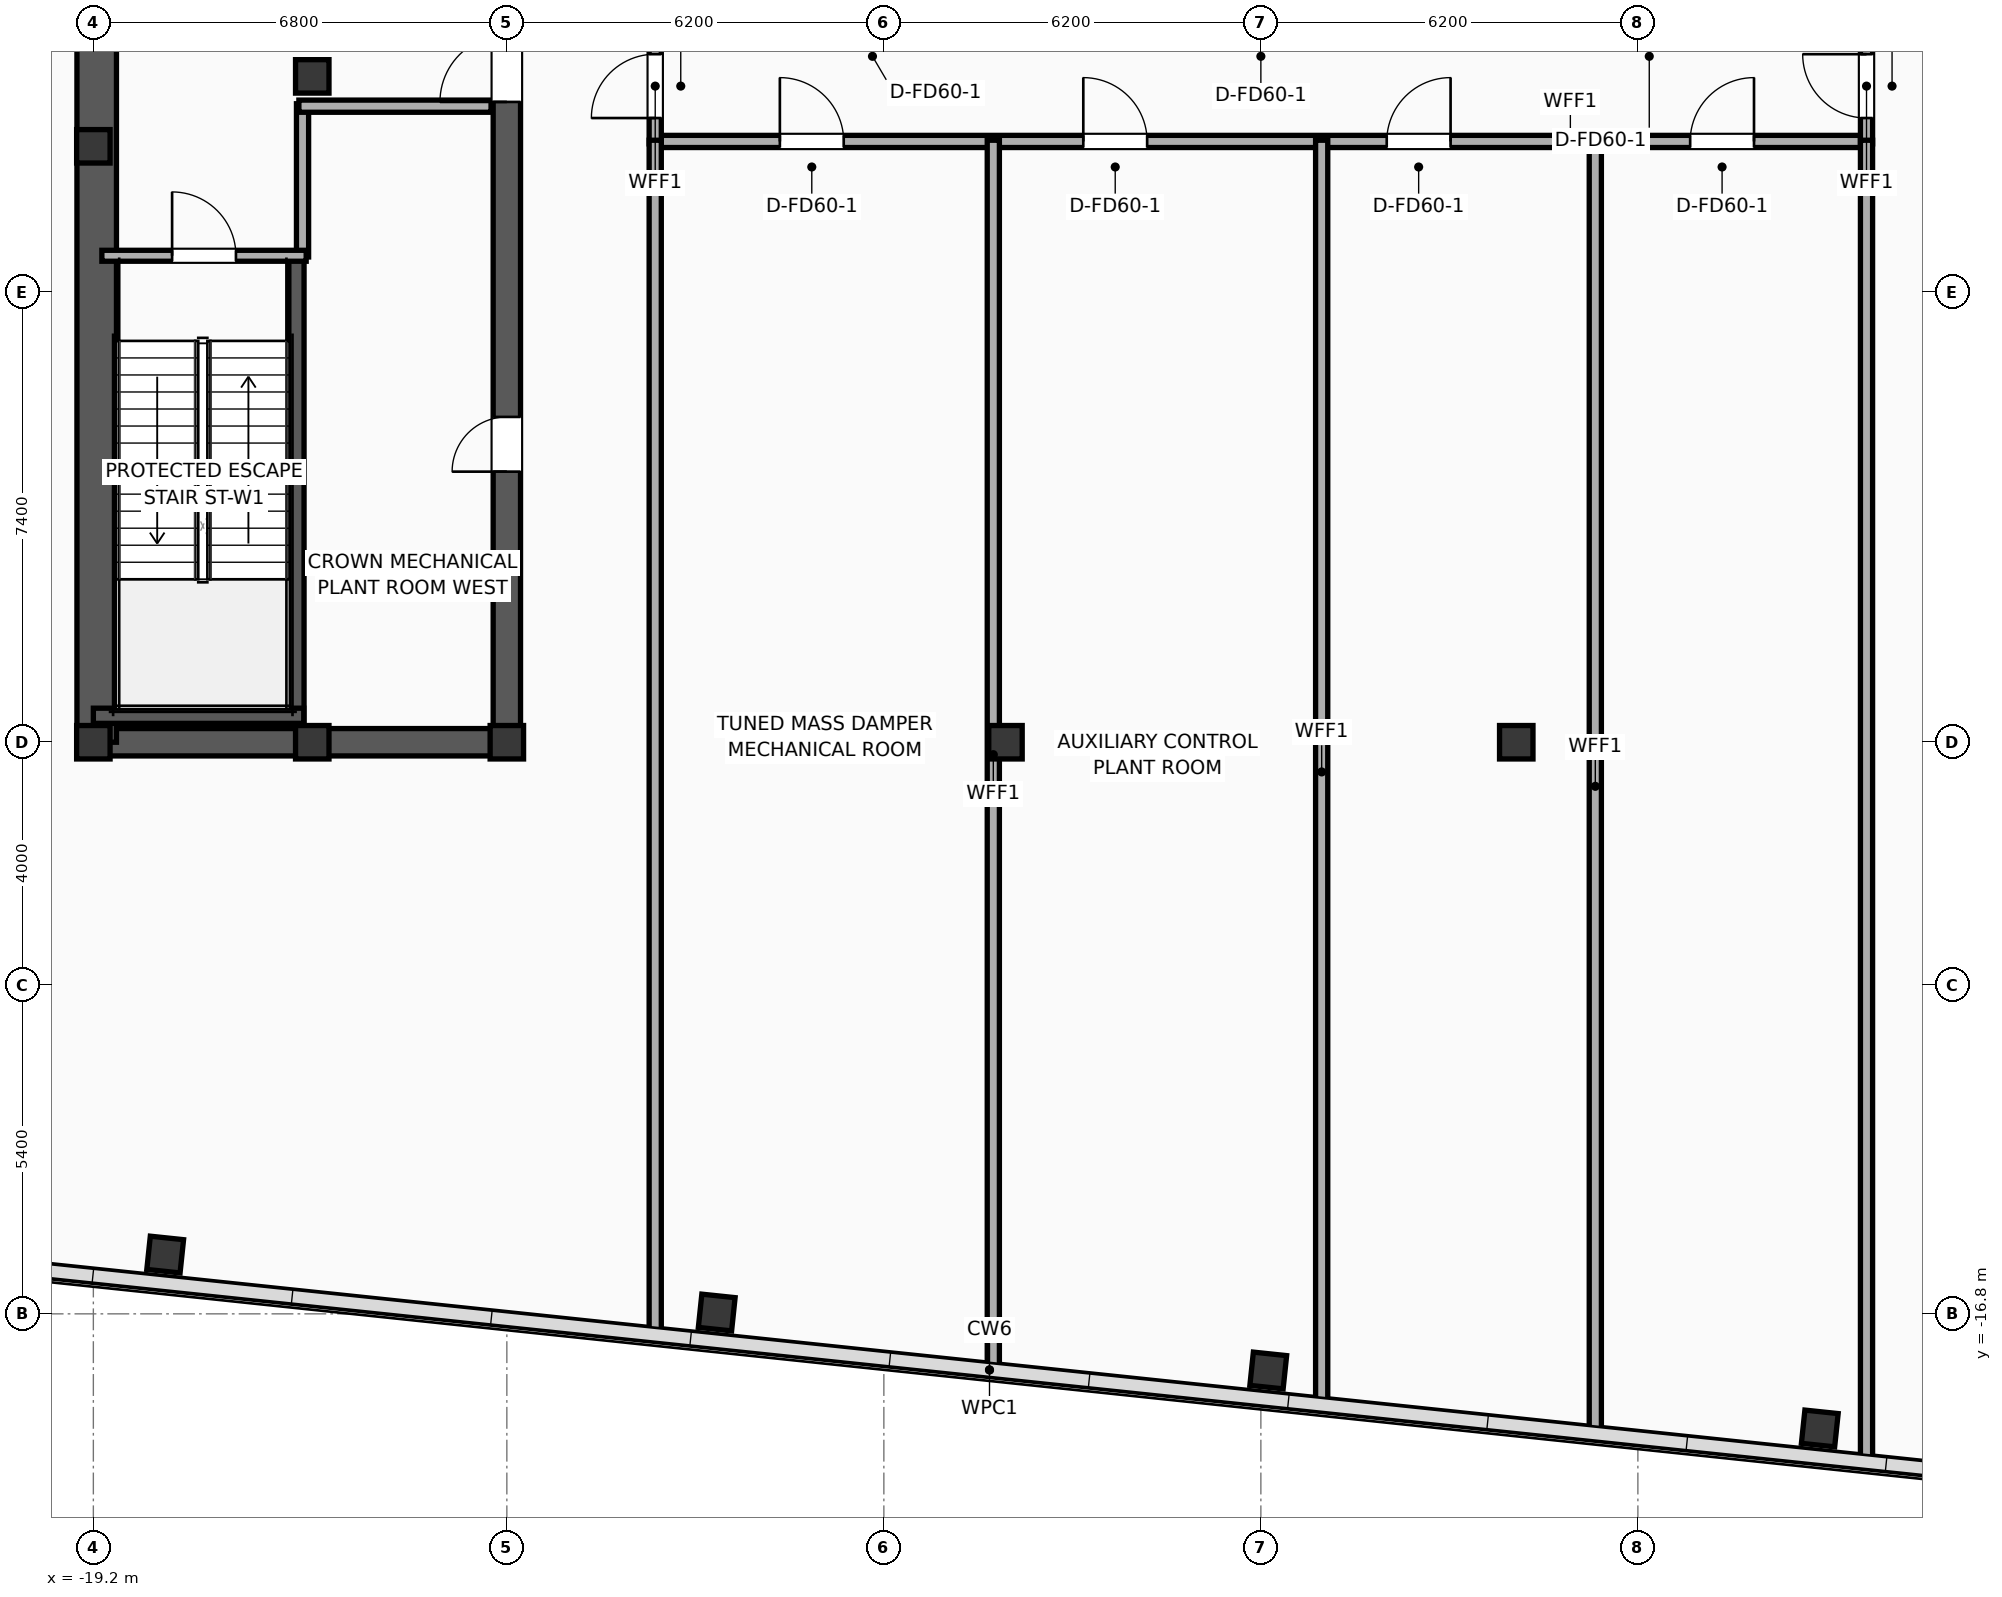
"""IFC4 building model, lengths in metres.
Left out: names, types, materials, properties, quantities, classifications, styles, units other than length and angle.
Written with IfcOpenShell. Run it as: python <this file> out.ifc"""

import sys

from ifc_helpers import new_model, si_unit, direction, frame, frame_2d, origin, origin_2d, place, context, subcontext, project, spatial, rectangle, hollow_rectangle, extrude, element, fill, save


model = new_model("IFC4")
c1 = context("Model", 3, precision=1e-05, world=origin(), true_north=direction((0.0, 1.0)))
c2 = subcontext(c1, "Body", "Model", "MODEL_VIEW")
j1 = project(units=[si_unit("LENGTHUNIT", "METRE"), si_unit("PLANEANGLEUNIT", "RADIAN")], contexts=[c1])
p1 = place(None, origin())
s1 = spatial("IfcSite", under=j1, at=p1, CompositionType="ELEMENT")
p2 = place(p1, origin())
s2 = spatial("IfcBuilding", under=s1, at=p2, CompositionType="ELEMENT")
p3 = place(p2, frame((0.0, 0.0, 326.6)))
s3 = spatial("IfcBuildingStorey", under=s2, at=p3, CompositionType="ELEMENT", Elevation=326.6)
for number, where, z_axis, x_axis in (
    (1, (-19.2, -7.4, 0.0), (0.0, 0.0, 1.0), (1.0, 0.0, 0.0)),
    (2, (-19.2, 2.4, 0.0), (0.0, 0.0, 1.0), (1.0, 0.0, 0.0)),
    (3, (-15.6, -7.4, 0.0), (0.0, 0.0, 1.0), (1.0, 0.0, 0.0)),
    (4, (-12.4, -7.4, 0.0), (0.0, 0.0, 1.0), (1.0, 0.0, 0.0)),
    (5, (-15.6, 3.55, 0.0), (0.0, 0.0, 1.0), (1.0, 0.0, 0.0)),
):
    element("IfcColumn", number, at=place(p3, frame(where, z_axis=z_axis, x_axis=x_axis)), inside=s3, PredefinedType="COLUMN", context=c2, shape_type="SweptSolid", body=[
        extrude(hollow_rectangle(XDim=0.55, YDim=0.55, WallThickness=0.022, at=origin_2d()), origin(), (0.0, 0.0, 1.0), 5.3),
    ])
p4 = place(p3, frame((-19.425, -7.4, 0.0), z_axis=(0.0, 0.0, 1.0), x_axis=(1.0, 0.0, 0.0)))
e6 = element("IfcWall", 6, at=p4, inside=s3, PredefinedType="SHEAR", context=c2, shape_type="SweptSolid", body=[
    extrude(rectangle(XDim=7.25, YDim=0.45, at=frame_2d((3.625, 0.0))), origin(), (0.0, 0.0, 1.0), 5.025),
])
p5 = place(p3, frame((-19.145, -7.4, 0.0), z_axis=(0.0, 0.0, 1.0), x_axis=(0.0, 1.0, 0.0)))
e7 = element("IfcWall", 7, at=p5, inside=s3, PredefinedType="SHEAR", context=c2, shape_type="SweptSolid", body=[
    extrude(rectangle(XDim=14.8, YDim=0.65, at=frame_2d((7.4, 0.0))), origin(), (0.0, 0.0, 1.0), 5.025),
])
p6 = place(p3, frame((-12.4, -7.4, 0.0), z_axis=(0.0, 0.0, 1.0), x_axis=(0.0, 1.0, 0.0)))
e8 = element("IfcWall", 8, at=p6, inside=s3, PredefinedType="SHEAR", context=c2, shape_type="SweptSolid", body=[
    extrude(rectangle(XDim=14.8, YDim=0.45, at=frame_2d((7.4, 0.0))), origin(), (0.0, 0.0, 1.0), 5.025),
])
p7 = place(p6, frame((10.53, 0.0, 0.0)))
e9 = element("IfcOpeningElement", 9, at=p7, cuts=e8, PredefinedType="OPENING", context=c2, shape_type="SweptSolid", body=[
    extrude(rectangle(XDim=1.1, YDim=2.05, at=frame_2d((0.55, 1.025))), frame((0.0, 0.235, 0.0), z_axis=(0.0, -1.0, 0.0), x_axis=(1.0, 0.0, 0.0)), (0.0, 0.0, 1.0), 0.47),
])
p8 = place(p6, frame((4.45, 0.0, 0.0)))
e10 = element("IfcOpeningElement", 10, at=p8, cuts=e8, PredefinedType="OPENING", context=c2, shape_type="SweptSolid", body=[
    extrude(rectangle(XDim=0.9, YDim=2.05, at=frame_2d((0.45, 1.025))), frame((0.0, 0.235, 0.0), z_axis=(0.0, -1.0, 0.0), x_axis=(1.0, 0.0, 0.0)), (0.0, 0.0, 1.0), 0.47),
])
p9 = place(p3, frame((-15.86, -7.085, 0.0), z_axis=(0.0, 0.0, 1.0), x_axis=(0.0, 1.0, 0.0)))
e11 = element("IfcWall", 11, at=p9, inside=s3, PredefinedType="SOLIDWALL", context=c2, shape_type="SweptSolid", body=[
    extrude(rectangle(XDim=7.685, YDim=0.25, at=frame_2d((3.843, 0.0))), origin(), (0.0, 0.0, 1.0), 5.025),
])
p10 = place(p3, frame((-19.2, -6.965, 0.0), z_axis=(0.0, 0.0, 1.0), x_axis=(1.0, 0.0, 0.0)))
e12 = element("IfcWall", 12, at=p10, inside=s3, PredefinedType="SOLIDWALL", context=c2, shape_type="SweptSolid", body=[
    extrude(rectangle(XDim=3.46, YDim=0.25, at=frame_2d((1.73, 0.0))), origin(), (0.0, 0.0, 1.0), 5.025),
])
for number, where, z_axis, x_axis in (
    (13, (-4.2, -7.4, 0.0), (0.0, 0.0, 1.0), (1.0, 0.0, 0.0)),
    (14, (4.2, -7.4, 0.0), (0.0, 0.0, 1.0), (1.0, 0.0, 0.0)),
    (15, (-18.019, -15.825, 0.0), (0.0, 0.0, 1.0), (0.995, -0.105, 0.0)),
    (16, (-8.948, -16.778, 0.0), (0.0, 0.0, 1.0), (0.995, -0.105, 0.0)),
    (17, (0.121, -17.732, 0.0), (0.0, 0.0, 1.0), (0.995, -0.105, 0.0)),
    (18, (9.191, -18.685, 0.0), (0.0, 0.0, 1.0), (0.995, -0.105, 0.0)),
):
    element("IfcColumn", number, at=place(p3, frame(where, z_axis=z_axis, x_axis=x_axis)), inside=s3, PredefinedType="COLUMN", context=c2, shape_type="SweptSolid", body=[
        extrude(hollow_rectangle(XDim=0.55, YDim=0.55, WallThickness=0.022, at=origin_2d()), origin(), (0.0, 0.0, 1.0), 5.3),
    ])
p11 = place(p3, frame((18.195, -20.104, 0.0), z_axis=(0.0, 0.0, 1.0), x_axis=(-0.994522116558, 0.104526358762, 0.0)))
e19 = element("IfcWall", 19, at=p11, inside=s3, PredefinedType="PARAPET", context=c2, shape_type="SweptSolid", body=[
    extrude(rectangle(XDim=45.564, YDim=0.22, at=frame_2d((22.782, 0.0))), origin(), (0.0, 0.0, 1.0), 1.2),
])
p12 = place(p3, frame((-15.76, 0.58, 0.0), z_axis=(0.0, 0.0, 1.0), x_axis=(0.0, 1.0, 0.0)))
e20 = element("IfcWall", 20, at=p12, inside=s3, PredefinedType="PARTITIONING", context=c2, shape_type="SweptSolid", body=[
    extrude(rectangle(XDim=2.52, YDim=0.2, at=frame_2d((1.26, 0.0))), origin(), (0.0, 0.0, 1.0), 5.025),
])
p13 = place(p3, frame((-15.82, 3.06, 0.0), z_axis=(0.0, 0.0, 1.0), x_axis=(1.0, 0.0, 0.0)))
e21 = element("IfcWall", 21, at=p13, inside=s3, PredefinedType="PARTITIONING", context=c2, shape_type="SweptSolid", body=[
    extrude(rectangle(XDim=3.16, YDim=0.2, at=frame_2d((1.58, 0.0))), origin(), (0.0, 0.0, 1.0), 5.025),
])
p14 = place(p3, frame((-19.06, 0.6, 0.0), z_axis=(0.0, 0.0, 1.0), x_axis=(1.0, 0.0, 0.0)))
e22 = element("IfcWall", 22, at=p14, inside=s3, PredefinedType="PARTITIONING", context=c2, shape_type="SweptSolid", body=[
    extrude(rectangle(XDim=3.36, YDim=0.18, at=frame_2d((1.68, 0.0))), origin(), (0.0, 0.0, 1.0), 5.025),
])
p15 = place(p14, frame((1.155, 0.0, 0.0)))
e23 = element("IfcOpeningElement", 23, at=p15, cuts=e22, PredefinedType="OPENING", context=c2, shape_type="SweptSolid", body=[
    extrude(rectangle(XDim=1.05, YDim=2.05, at=frame_2d((0.525, 1.025))), frame((0.0, 0.1, 0.0), z_axis=(0.0, -1.0, 0.0), x_axis=(1.0, 0.0, 0.0)), (0.0, 0.0, 1.0), 0.2),
])
p16 = place(p3, frame((-9.98, 2.48, 0.0), z_axis=(0.0, 0.0, 1.0), x_axis=(1.0, 0.0, 0.0)))
e24 = element("IfcWall", 24, at=p16, inside=s3, PredefinedType="PARTITIONING", context=c2, shape_type="SweptSolid", body=[
    extrude(rectangle(XDim=19.96, YDim=0.2, at=frame_2d((9.98, 0.0))), origin(), (0.0, 0.0, 1.0), 4.595),
])
p17 = place(p16, frame((2.07, 0.0, 0.0)))
e25 = element("IfcOpeningElement", 25, at=p17, cuts=e24, PredefinedType="OPENING", context=c2, shape_type="SweptSolid", body=[
    extrude(rectangle(XDim=1.05, YDim=2.05, at=frame_2d((0.525, 1.025))), frame((0.0, 0.11, 0.0), z_axis=(0.0, -1.0, 0.0), x_axis=(1.0, 0.0, 0.0)), (0.0, 0.0, 1.0), 0.22),
])
p18 = place(p16, frame((7.06, 0.0, 0.0)))
e26 = element("IfcOpeningElement", 26, at=p18, cuts=e24, PredefinedType="OPENING", context=c2, shape_type="SweptSolid", body=[
    extrude(rectangle(XDim=1.05, YDim=2.05, at=frame_2d((0.525, 1.025))), frame((0.0, 0.11, 0.0), z_axis=(0.0, -1.0, 0.0), x_axis=(1.0, 0.0, 0.0)), (0.0, 0.0, 1.0), 0.22),
])
p19 = place(p16, frame((12.05, 0.0, 0.0)))
e27 = element("IfcOpeningElement", 27, at=p19, cuts=e24, PredefinedType="OPENING", context=c2, shape_type="SweptSolid", body=[
    extrude(rectangle(XDim=1.05, YDim=2.05, at=frame_2d((0.525, 1.025))), frame((0.0, 0.11, 0.0), z_axis=(0.0, -1.0, 0.0), x_axis=(1.0, 0.0, 0.0)), (0.0, 0.0, 1.0), 0.22),
])
p20 = place(p16, frame((17.04, 0.0, 0.0)))
e28 = element("IfcOpeningElement", 28, at=p20, cuts=e24, PredefinedType="OPENING", context=c2, shape_type="SweptSolid", body=[
    extrude(rectangle(XDim=1.05, YDim=2.05, at=frame_2d((0.525, 1.025))), frame((0.0, 0.11, 0.0), z_axis=(0.0, -1.0, 0.0), x_axis=(1.0, 0.0, 0.0)), (0.0, 0.0, 1.0), 0.22),
])
p21 = place(p3, frame((-9.96, 2.44, 0.0), z_axis=(0.0, 0.0, 1.0), x_axis=(0.0, 1.0, 0.0)))
e29 = element("IfcWall", 29, at=p21, inside=s3, PredefinedType="PARTITIONING", context=c2, shape_type="SweptSolid", body=[
    extrude(rectangle(XDim=1.9, YDim=0.2, at=frame_2d((0.95, 0.0))), origin(), (0.0, 0.0, 1.0), 5.025),
])
p22 = place(p21, frame((0.425, 0.0, 0.0)))
e30 = element("IfcOpeningElement", 30, at=p22, cuts=e29, PredefinedType="OPENING", context=c2, shape_type="SweptSolid", body=[
    extrude(rectangle(XDim=1.05, YDim=2.05, at=frame_2d((0.525, 1.025))), frame((0.0, 0.11, 0.0), z_axis=(0.0, -1.0, 0.0), x_axis=(1.0, 0.0, 0.0)), (0.0, 0.0, 1.0), 0.22),
])
p23 = place(p3, frame((9.96, 2.44, 0.0), z_axis=(0.0, 0.0, 1.0), x_axis=(0.0, 1.0, 0.0)))
e31 = element("IfcWall", 31, at=p23, inside=s3, PredefinedType="PARTITIONING", context=c2, shape_type="SweptSolid", body=[
    extrude(rectangle(XDim=1.9, YDim=0.2, at=frame_2d((0.95, 0.0))), origin(), (0.0, 0.0, 1.0), 5.025),
])
p24 = place(p23, frame((0.425, 0.0, 0.0)))
e32 = element("IfcOpeningElement", 32, at=p24, cuts=e31, PredefinedType="OPENING", context=c2, shape_type="SweptSolid", body=[
    extrude(rectangle(XDim=1.05, YDim=2.05, at=frame_2d((0.525, 1.025))), frame((0.0, 0.11, 0.0), z_axis=(0.0, -1.0, 0.0), x_axis=(1.0, 0.0, 0.0)), (0.0, 0.0, 1.0), 0.22),
])
p25 = place(p3, frame((-9.96, -17.125, 0.0), z_axis=(0.0, 0.0, 1.0), x_axis=(0.0, 1.0, 0.0)))
e33 = element("IfcWall", 33, at=p25, inside=s3, PredefinedType="PARTITIONING", context=c2, shape_type="SweptSolid", body=[
    extrude(rectangle(XDim=19.625, YDim=0.2, at=frame_2d((9.812, 0.0))), origin(), (0.0, 0.0, 1.0), 4.465),
])
p26 = place(p3, frame((9.96, -19.218, 0.0), z_axis=(0.0, 0.0, 1.0), x_axis=(0.0, 1.0, 0.0)))
e34 = element("IfcWall", 34, at=p26, inside=s3, PredefinedType="PARTITIONING", context=c2, shape_type="SweptSolid", body=[
    extrude(rectangle(XDim=21.718, YDim=0.2, at=frame_2d((10.859, 0.0))), origin(), (0.0, 0.0, 1.0), 4.465),
])
p27 = place(p3, frame((-4.4, -17.709, 0.0), z_axis=(0.0, 0.0, 1.0), x_axis=(0.0, 1.0, 0.0)))
e35 = element("IfcWall", 35, at=p27, inside=s3, PredefinedType="PARTITIONING", context=c2, shape_type="SweptSolid", body=[
    extrude(rectangle(XDim=20.209, YDim=0.2, at=frame_2d((10.104, 0.0))), origin(), (0.0, 0.0, 1.0), 4.465),
])
p28 = place(p3, frame((1.0, -18.276, 0.0), z_axis=(0.0, 0.0, 1.0), x_axis=(0.0, 1.0, 0.0)))
e36 = element("IfcWall", 36, at=p28, inside=s3, PredefinedType="PARTITIONING", context=c2, shape_type="SweptSolid", body=[
    extrude(rectangle(XDim=20.776, YDim=0.2, at=frame_2d((10.388, 0.0))), origin(), (0.0, 0.0, 1.0), 4.465),
])
p29 = place(p3, frame((5.5, -18.75, 0.0), z_axis=(0.0, 0.0, 1.0), x_axis=(0.0, 1.0, 0.0)))
e37 = element("IfcWall", 37, at=p29, inside=s3, PredefinedType="PARTITIONING", context=c2, shape_type="SweptSolid", body=[
    extrude(rectangle(XDim=21.25, YDim=0.2, at=frame_2d((10.625, 0.0))), origin(), (0.0, 0.0, 1.0), 5.025),
])
p30 = place(p15, origin())
e38 = element("IfcDoor", 38, at=p30, inside=s3, OperationType="SINGLE_SWING_LEFT", PredefinedType="DOOR", context=c2, shape_type="SweptSolid", body=[
    extrude(rectangle(XDim=1.05, YDim=2.05, at=frame_2d((0.525, 1.025))), frame((0.0, 0.025, 0.0), z_axis=(0.0, -1.0, 0.0), x_axis=(1.0, 0.0, 0.0)), (0.0, 0.0, 1.0), 0.05),
])
fill(e23, e38)
p31 = place(p17, origin())
e39 = element("IfcDoor", 39, at=p31, inside=s3, OperationType="SINGLE_SWING_LEFT", PredefinedType="DOOR", context=c2, shape_type="SweptSolid", body=[
    extrude(rectangle(XDim=1.05, YDim=2.05, at=frame_2d((0.525, 1.025))), frame((0.0, 0.025, 0.0), z_axis=(0.0, -1.0, 0.0), x_axis=(1.0, 0.0, 0.0)), (0.0, 0.0, 1.0), 0.05),
])
fill(e25, e39)
p32 = place(p18, origin())
e40 = element("IfcDoor", 40, at=p32, inside=s3, OperationType="SINGLE_SWING_LEFT", PredefinedType="DOOR", context=c2, shape_type="SweptSolid", body=[
    extrude(rectangle(XDim=1.05, YDim=2.05, at=frame_2d((0.525, 1.025))), frame((0.0, 0.025, 0.0), z_axis=(0.0, -1.0, 0.0), x_axis=(1.0, 0.0, 0.0)), (0.0, 0.0, 1.0), 0.05),
])
fill(e26, e40)
p33 = place(p19, origin())
e41 = element("IfcDoor", 41, at=p33, inside=s3, OperationType="SINGLE_SWING_RIGHT", PredefinedType="DOOR", context=c2, shape_type="SweptSolid", body=[
    extrude(rectangle(XDim=1.05, YDim=2.05, at=frame_2d((0.525, 1.025))), frame((0.0, 0.025, 0.0), z_axis=(0.0, -1.0, 0.0), x_axis=(1.0, 0.0, 0.0)), (0.0, 0.0, 1.0), 0.05),
])
fill(e27, e41)
p34 = place(p20, origin())
e42 = element("IfcDoor", 42, at=p34, inside=s3, OperationType="SINGLE_SWING_RIGHT", PredefinedType="DOOR", context=c2, shape_type="SweptSolid", body=[
    extrude(rectangle(XDim=1.05, YDim=2.05, at=frame_2d((0.525, 1.025))), frame((0.0, 0.025, 0.0), z_axis=(0.0, -1.0, 0.0), x_axis=(1.0, 0.0, 0.0)), (0.0, 0.0, 1.0), 0.05),
])
fill(e28, e42)
p35 = place(p22, origin())
e43 = element("IfcDoor", 43, at=p35, inside=s3, OperationType="SINGLE_SWING_LEFT", PredefinedType="DOOR", context=c2, shape_type="SweptSolid", body=[
    extrude(rectangle(XDim=1.05, YDim=2.05, at=frame_2d((0.525, 1.025))), frame((0.0, 0.025, 0.0), z_axis=(0.0, -1.0, 0.0), x_axis=(1.0, 0.0, 0.0)), (0.0, 0.0, 1.0), 0.05),
])
fill(e30, e43)
p36 = place(p24, origin())
e44 = element("IfcDoor", 44, at=p36, inside=s3, OperationType="SINGLE_SWING_RIGHT", PredefinedType="DOOR", context=c2, shape_type="SweptSolid", body=[
    extrude(rectangle(XDim=1.05, YDim=2.05, at=frame_2d((0.525, 1.025))), frame((0.0, 0.025, 0.0), z_axis=(0.0, -1.0, 0.0), x_axis=(1.0, 0.0, 0.0)), (0.0, 0.0, 1.0), 0.05),
])
fill(e32, e44)
p37 = place(p7, origin())
e45 = element("IfcDoor", 45, at=p37, inside=s3, OperationType="SINGLE_SWING_LEFT", PredefinedType="DOOR", context=c2, shape_type="SweptSolid", body=[
    extrude(rectangle(XDim=1.1, YDim=2.05, at=frame_2d((0.55, 1.025))), frame((0.0, 0.025, 0.0), z_axis=(0.0, -1.0, 0.0), x_axis=(1.0, 0.0, 0.0)), (0.0, 0.0, 1.0), 0.05),
])
fill(e9, e45)
p38 = place(p8, origin())
e46 = element("IfcDoor", 46, at=p38, inside=s3, OperationType="SINGLE_SWING_LEFT", PredefinedType="DOOR", context=c2, shape_type="SweptSolid", body=[
    extrude(rectangle(XDim=0.9, YDim=2.05, at=frame_2d((0.45, 1.025))), frame((0.0, 0.025, 0.0), z_axis=(0.0, -1.0, 0.0), x_axis=(1.0, 0.0, 0.0)), (0.0, 0.0, 1.0), 0.05),
])
fill(e10, e46)
save(model, sys.argv[1])
